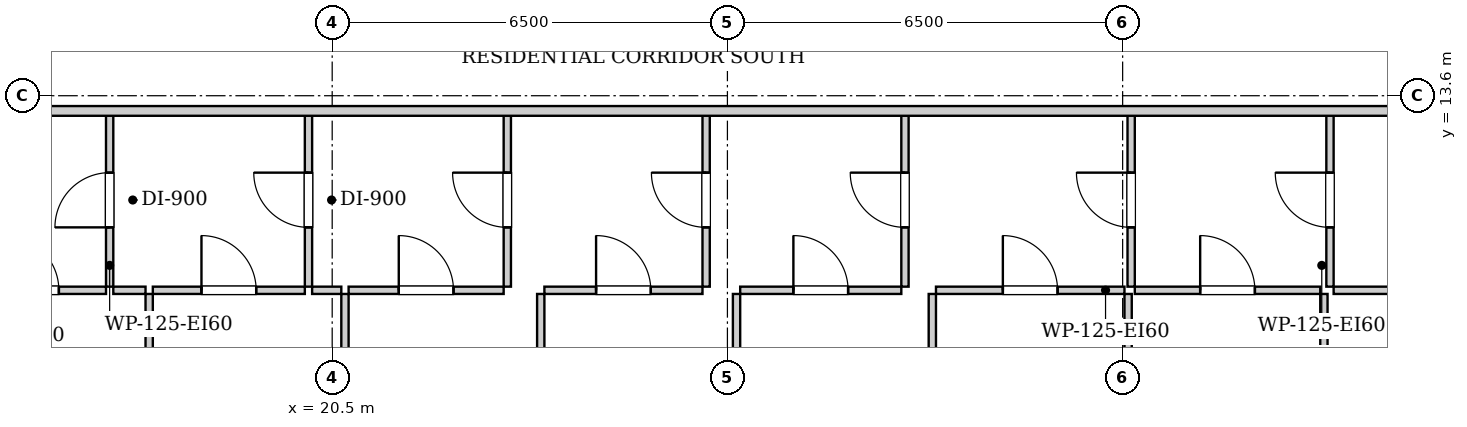
"""IFC4 building model, lengths in metres.
Left out: names, types, materials, properties, quantities, classifications, styles, units other than length and angle.
Written with IfcOpenShell. Run it as: python <this file> out.ifc"""

import sys

from ifc_helpers import new_model, si_unit, direction, frame, frame_2d, origin, place, context, subcontext, project, spatial, rectangle, extrude, element, fill, save


model = new_model("IFC4")
c1 = context("Model", 3, precision=1e-05, world=origin(), true_north=direction((0.0, 1.0)))
c2 = subcontext(c1, "Body", "Model", "MODEL_VIEW")
j1 = project(units=[si_unit("LENGTHUNIT", "METRE"), si_unit("PLANEANGLEUNIT", "RADIAN")], contexts=[c1])
p1 = place(None, origin())
s1 = spatial("IfcSite", under=j1, at=p1, CompositionType="ELEMENT")
p2 = place(p1, origin())
s2 = spatial("IfcBuilding", under=s1, at=p2, CompositionType="ELEMENT")
p3 = place(p2, frame((0.0, 0.0, 97.5)))
s3 = spatial("IfcBuildingStorey", under=s2, at=p3, CompositionType="ELEMENT", Elevation=97.5)
p4 = place(p3, frame((16.84, 10.46, 0.0), z_axis=(0.0, 0.0, 1.0), x_axis=(0.0, 1.0, 0.0)))
e1 = element("IfcWall", 1, at=p4, inside=s3, PredefinedType="PARTITIONING", context=c2, shape_type="SweptSolid", body=[
    extrude(rectangle(XDim=2.85, YDim=0.12, at=frame_2d((1.425, 0.0))), origin(), (0.0, 0.0, 1.0), 2.94),
])
p5 = place(p4, frame((0.975, 0.0, 0.0)))
e2 = element("IfcOpeningElement", 2, at=p5, cuts=e1, PredefinedType="OPENING", context=c2, shape_type="SweptSolid", body=[
    extrude(rectangle(XDim=0.9, YDim=2.05, at=frame_2d((0.45, 1.025))), frame((0.0, 0.07, 0.0), z_axis=(0.0, -1.0, 0.0), x_axis=(1.0, 0.0, 0.0)), (0.0, 0.0, 1.0), 0.14),
])
p6 = place(p3, frame((14.33, 10.4, 0.0), z_axis=(0.0, 0.0, 1.0), x_axis=(1.0, 0.0, 0.0)))
e3 = element("IfcWall", 3, at=p6, inside=s3, PredefinedType="PARTITIONING", context=c2, shape_type="SweptSolid", body=[
    extrude(rectangle(XDim=2.45, YDim=0.12, at=frame_2d((1.225, 0.0))), origin(), (0.0, 0.0, 1.0), 2.94),
])
p7 = place(p6, frame((0.775, 0.0, 0.0)))
e4 = element("IfcOpeningElement", 4, at=p7, cuts=e3, PredefinedType="OPENING", context=c2, shape_type="SweptSolid", body=[
    extrude(rectangle(XDim=0.9, YDim=2.05, at=frame_2d((0.45, 1.025))), frame((0.0, 0.07, 0.0), z_axis=(0.0, -1.0, 0.0), x_axis=(1.0, 0.0, 0.0)), (0.0, 0.0, 1.0), 0.14),
])
p8 = place(p3, frame((20.11, 10.46, 0.0), z_axis=(0.0, 0.0, 1.0), x_axis=(0.0, 1.0, 0.0)))
e5 = element("IfcWall", 5, at=p8, inside=s3, PredefinedType="PARTITIONING", context=c2, shape_type="SweptSolid", body=[
    extrude(rectangle(XDim=2.85, YDim=0.12, at=frame_2d((1.425, 0.0))), origin(), (0.0, 0.0, 1.0), 2.94),
])
p9 = place(p8, frame((0.975, 0.0, 0.0)))
e6 = element("IfcOpeningElement", 6, at=p9, cuts=e5, PredefinedType="OPENING", context=c2, shape_type="SweptSolid", body=[
    extrude(rectangle(XDim=0.9, YDim=2.05, at=frame_2d((0.45, 1.025))), frame((0.0, 0.07, 0.0), z_axis=(0.0, -1.0, 0.0), x_axis=(1.0, 0.0, 0.0)), (0.0, 0.0, 1.0), 0.14),
])
p10 = place(p3, frame((16.9, 10.4, 0.0), z_axis=(0.0, 0.0, 1.0), x_axis=(1.0, 0.0, 0.0)))
e7 = element("IfcWall", 7, at=p10, inside=s3, PredefinedType="PARTITIONING", context=c2, shape_type="SweptSolid", body=[
    extrude(rectangle(XDim=0.53, YDim=0.12, at=frame_2d((0.265, 0.0))), origin(), (0.0, 0.0, 1.0), 2.94),
])
p11 = place(p3, frame((17.55, 10.4, 0.0), z_axis=(0.0, 0.0, 1.0), x_axis=(1.0, 0.0, 0.0)))
e8 = element("IfcWall", 8, at=p11, inside=s3, PredefinedType="PARTITIONING", context=c2, shape_type="SweptSolid", body=[
    extrude(rectangle(XDim=2.5, YDim=0.12, at=frame_2d((1.25, 0.0))), origin(), (0.0, 0.0, 1.0), 2.94),
])
p12 = place(p11, frame((0.8, 0.0, 0.0)))
e9 = element("IfcOpeningElement", 9, at=p12, cuts=e8, PredefinedType="OPENING", context=c2, shape_type="SweptSolid", body=[
    extrude(rectangle(XDim=0.9, YDim=2.05, at=frame_2d((0.45, 1.025))), frame((0.0, 0.07, 0.0), z_axis=(0.0, -1.0, 0.0), x_axis=(1.0, 0.0, 0.0)), (0.0, 0.0, 1.0), 0.14),
])
p13 = place(p3, frame((23.38, 10.46, 0.0), z_axis=(0.0, 0.0, 1.0), x_axis=(0.0, 1.0, 0.0)))
e10 = element("IfcWall", 10, at=p13, inside=s3, PredefinedType="PARTITIONING", context=c2, shape_type="SweptSolid", body=[
    extrude(rectangle(XDim=2.85, YDim=0.12, at=frame_2d((1.425, 0.0))), origin(), (0.0, 0.0, 1.0), 2.94),
])
p14 = place(p13, frame((0.975, 0.0, 0.0)))
e11 = element("IfcOpeningElement", 11, at=p14, cuts=e10, PredefinedType="OPENING", context=c2, shape_type="SweptSolid", body=[
    extrude(rectangle(XDim=0.9, YDim=2.05, at=frame_2d((0.45, 1.025))), frame((0.0, 0.07, 0.0), z_axis=(0.0, -1.0, 0.0), x_axis=(1.0, 0.0, 0.0)), (0.0, 0.0, 1.0), 0.14),
])
p15 = place(p3, frame((20.17, 10.4, 0.0), z_axis=(0.0, 0.0, 1.0), x_axis=(1.0, 0.0, 0.0)))
e12 = element("IfcWall", 12, at=p15, inside=s3, PredefinedType="PARTITIONING", context=c2, shape_type="SweptSolid", body=[
    extrude(rectangle(XDim=0.48, YDim=0.12, at=frame_2d((0.24, 0.0))), origin(), (0.0, 0.0, 1.0), 2.94),
])
p16 = place(p3, frame((20.77, 10.4, 0.0), z_axis=(0.0, 0.0, 1.0), x_axis=(1.0, 0.0, 0.0)))
e13 = element("IfcWall", 13, at=p16, inside=s3, PredefinedType="PARTITIONING", context=c2, shape_type="SweptSolid", body=[
    extrude(rectangle(XDim=2.55, YDim=0.12, at=frame_2d((1.275, 0.0))), origin(), (0.0, 0.0, 1.0), 2.94),
])
p17 = place(p16, frame((0.825, 0.0, 0.0)))
e14 = element("IfcOpeningElement", 14, at=p17, cuts=e13, PredefinedType="OPENING", context=c2, shape_type="SweptSolid", body=[
    extrude(rectangle(XDim=0.9, YDim=2.05, at=frame_2d((0.45, 1.025))), frame((0.0, 0.07, 0.0), z_axis=(0.0, -1.0, 0.0), x_axis=(1.0, 0.0, 0.0)), (0.0, 0.0, 1.0), 0.14),
])
p18 = place(p3, frame((26.65, 10.46, 0.0), z_axis=(0.0, 0.0, 1.0), x_axis=(0.0, 1.0, 0.0)))
e15 = element("IfcWall", 15, at=p18, inside=s3, PredefinedType="PARTITIONING", context=c2, shape_type="SweptSolid", body=[
    extrude(rectangle(XDim=2.85, YDim=0.12, at=frame_2d((1.425, 0.0))), origin(), (0.0, 0.0, 1.0), 2.94),
])
p19 = place(p18, frame((0.975, 0.0, 0.0)))
e16 = element("IfcOpeningElement", 16, at=p19, cuts=e15, PredefinedType="OPENING", context=c2, shape_type="SweptSolid", body=[
    extrude(rectangle(XDim=0.9, YDim=2.05, at=frame_2d((0.45, 1.025))), frame((0.0, 0.07, 0.0), z_axis=(0.0, -1.0, 0.0), x_axis=(1.0, 0.0, 0.0)), (0.0, 0.0, 1.0), 0.14),
])
p20 = place(p3, frame((23.99, 10.4, 0.0), z_axis=(0.0, 0.0, 1.0), x_axis=(1.0, 0.0, 0.0)))
e17 = element("IfcWall", 17, at=p20, inside=s3, PredefinedType="PARTITIONING", context=c2, shape_type="SweptSolid", body=[
    extrude(rectangle(XDim=2.6, YDim=0.12, at=frame_2d((1.3, 0.0))), origin(), (0.0, 0.0, 1.0), 2.94),
])
p21 = place(p20, frame((0.85, 0.0, 0.0)))
e18 = element("IfcOpeningElement", 18, at=p21, cuts=e17, PredefinedType="OPENING", context=c2, shape_type="SweptSolid", body=[
    extrude(rectangle(XDim=0.9, YDim=2.05, at=frame_2d((0.45, 1.025))), frame((0.0, 0.07, 0.0), z_axis=(0.0, -1.0, 0.0), x_axis=(1.0, 0.0, 0.0)), (0.0, 0.0, 1.0), 0.14),
])
p22 = place(p3, frame((29.92, 10.46, 0.0), z_axis=(0.0, 0.0, 1.0), x_axis=(0.0, 1.0, 0.0)))
e19 = element("IfcWall", 19, at=p22, inside=s3, PredefinedType="PARTITIONING", context=c2, shape_type="SweptSolid", body=[
    extrude(rectangle(XDim=2.85, YDim=0.12, at=frame_2d((1.425, 0.0))), origin(), (0.0, 0.0, 1.0), 2.94),
])
p23 = place(p22, frame((0.975, 0.0, 0.0)))
e20 = element("IfcOpeningElement", 20, at=p23, cuts=e19, PredefinedType="OPENING", context=c2, shape_type="SweptSolid", body=[
    extrude(rectangle(XDim=0.9, YDim=2.05, at=frame_2d((0.45, 1.025))), frame((0.0, 0.07, 0.0), z_axis=(0.0, -1.0, 0.0), x_axis=(1.0, 0.0, 0.0)), (0.0, 0.0, 1.0), 0.14),
])
p24 = place(p3, frame((27.21, 10.4, 0.0), z_axis=(0.0, 0.0, 1.0), x_axis=(1.0, 0.0, 0.0)))
e21 = element("IfcWall", 21, at=p24, inside=s3, PredefinedType="PARTITIONING", context=c2, shape_type="SweptSolid", body=[
    extrude(rectangle(XDim=2.65, YDim=0.12, at=frame_2d((1.325, 0.0))), origin(), (0.0, 0.0, 1.0), 2.94),
])
p25 = place(p24, frame((0.875, 0.0, 0.0)))
e22 = element("IfcOpeningElement", 22, at=p25, cuts=e21, PredefinedType="OPENING", context=c2, shape_type="SweptSolid", body=[
    extrude(rectangle(XDim=0.9, YDim=2.05, at=frame_2d((0.45, 1.025))), frame((0.0, 0.07, 0.0), z_axis=(0.0, -1.0, 0.0), x_axis=(1.0, 0.0, 0.0)), (0.0, 0.0, 1.0), 0.14),
])
p26 = place(p3, frame((33.64, 10.46, 0.0), z_axis=(0.0, 0.0, 1.0), x_axis=(0.0, 1.0, 0.0)))
e23 = element("IfcWall", 23, at=p26, inside=s3, PredefinedType="PARTITIONING", context=c2, shape_type="SweptSolid", body=[
    extrude(rectangle(XDim=2.85, YDim=0.12, at=frame_2d((1.425, 0.0))), origin(), (0.0, 0.0, 1.0), 2.94),
])
p27 = place(p26, frame((0.975, 0.0, 0.0)))
e24 = element("IfcOpeningElement", 24, at=p27, cuts=e23, PredefinedType="OPENING", context=c2, shape_type="SweptSolid", body=[
    extrude(rectangle(XDim=0.9, YDim=2.05, at=frame_2d((0.45, 1.025))), frame((0.0, 0.07, 0.0), z_axis=(0.0, -1.0, 0.0), x_axis=(1.0, 0.0, 0.0)), (0.0, 0.0, 1.0), 0.14),
])
p28 = place(p3, frame((30.43, 10.4, 0.0), z_axis=(0.0, 0.0, 1.0), x_axis=(1.0, 0.0, 0.0)))
e25 = element("IfcWall", 25, at=p28, inside=s3, PredefinedType="PARTITIONING", context=c2, shape_type="SweptSolid", body=[
    extrude(rectangle(XDim=3.1, YDim=0.12, at=frame_2d((1.55, 0.0))), origin(), (0.0, 0.0, 1.0), 2.94),
])
p29 = place(p28, frame((1.1, 0.0, 0.0)))
e26 = element("IfcOpeningElement", 26, at=p29, cuts=e25, PredefinedType="OPENING", context=c2, shape_type="SweptSolid", body=[
    extrude(rectangle(XDim=0.9, YDim=2.05, at=frame_2d((0.45, 1.025))), frame((0.0, 0.07, 0.0), z_axis=(0.0, -1.0, 0.0), x_axis=(1.0, 0.0, 0.0)), (0.0, 0.0, 1.0), 0.14),
])
p30 = place(p3, frame((36.91, 10.46, 0.0), z_axis=(0.0, 0.0, 1.0), x_axis=(0.0, 1.0, 0.0)))
e27 = element("IfcWall", 27, at=p30, inside=s3, PredefinedType="PARTITIONING", context=c2, shape_type="SweptSolid", body=[
    extrude(rectangle(XDim=2.85, YDim=0.12, at=frame_2d((1.425, 0.0))), origin(), (0.0, 0.0, 1.0), 2.94),
])
p31 = place(p30, frame((0.975, 0.0, 0.0)))
e28 = element("IfcOpeningElement", 28, at=p31, cuts=e27, PredefinedType="OPENING", context=c2, shape_type="SweptSolid", body=[
    extrude(rectangle(XDim=0.9, YDim=2.05, at=frame_2d((0.45, 1.025))), frame((0.0, 0.07, 0.0), z_axis=(0.0, -1.0, 0.0), x_axis=(1.0, 0.0, 0.0)), (0.0, 0.0, 1.0), 0.14),
])
p32 = place(p3, frame((33.7, 10.4, 0.0), z_axis=(0.0, 0.0, 1.0), x_axis=(1.0, 0.0, 0.0)))
e29 = element("IfcWall", 29, at=p32, inside=s3, PredefinedType="PARTITIONING", context=c2, shape_type="SweptSolid", body=[
    extrude(rectangle(XDim=3.05, YDim=0.12, at=frame_2d((1.525, 0.0))), origin(), (0.0, 0.0, 1.0), 2.94),
])
p33 = place(p32, frame((1.075, 0.0, 0.0)))
e30 = element("IfcOpeningElement", 30, at=p33, cuts=e29, PredefinedType="OPENING", context=c2, shape_type="SweptSolid", body=[
    extrude(rectangle(XDim=0.9, YDim=2.05, at=frame_2d((0.45, 1.025))), frame((0.0, 0.07, 0.0), z_axis=(0.0, -1.0, 0.0), x_axis=(1.0, 0.0, 0.0)), (0.0, 0.0, 1.0), 0.14),
])
p34 = place(p3, frame((36.97, 10.4, 0.0), z_axis=(0.0, 0.0, 1.0), x_axis=(1.0, 0.0, 0.0)))
e31 = element("IfcWall", 31, at=p34, inside=s3, PredefinedType="PARTITIONING", context=c2, shape_type="SweptSolid", body=[
    extrude(rectangle(XDim=3.85, YDim=0.12, at=frame_2d((1.925, 0.0))), origin(), (0.0, 0.0, 1.0), 2.94),
])
p35 = place(p34, frame((1.475, 0.0, 0.0)))
e32 = element("IfcOpeningElement", 32, at=p35, cuts=e31, PredefinedType="OPENING", context=c2, shape_type="SweptSolid", body=[
    extrude(rectangle(XDim=0.9, YDim=2.05, at=frame_2d((0.45, 1.025))), frame((0.0, 0.07, 0.0), z_axis=(0.0, -1.0, 0.0), x_axis=(1.0, 0.0, 0.0)), (0.0, 0.0, 1.0), 0.14),
])
p36 = place(p3, frame((17.49, 0.28, 0.0), z_axis=(0.0, 0.0, 1.0), x_axis=(0.0, 1.0, 0.0)))
e33 = element("IfcWall", 33, at=p36, inside=s3, PredefinedType="PARTITIONING", context=c2, shape_type="SweptSolid", body=[
    extrude(rectangle(XDim=10.06, YDim=0.12, at=frame_2d((5.03, 0.0))), origin(), (0.0, 0.0, 1.0), 2.94),
])
p37 = place(p36, frame((4.565, 0.0, 0.0)))
e34 = element("IfcOpeningElement", 34, at=p37, cuts=e33, PredefinedType="OPENING", context=c2, shape_type="SweptSolid", body=[
    extrude(rectangle(XDim=0.9, YDim=2.05, at=frame_2d((0.45, 1.025))), frame((0.0, 0.07, 0.0), z_axis=(0.0, -1.0, 0.0), x_axis=(1.0, 0.0, 0.0)), (0.0, 0.0, 1.0), 0.14),
])
p38 = place(p3, frame((20.71, 0.28, 0.0), z_axis=(0.0, 0.0, 1.0), x_axis=(0.0, 1.0, 0.0)))
e35 = element("IfcWall", 35, at=p38, inside=s3, PredefinedType="PARTITIONING", context=c2, shape_type="SweptSolid", body=[
    extrude(rectangle(XDim=10.06, YDim=0.12, at=frame_2d((5.03, 0.0))), origin(), (0.0, 0.0, 1.0), 2.94),
])
p39 = place(p38, frame((4.565, 0.0, 0.0)))
e36 = element("IfcOpeningElement", 36, at=p39, cuts=e35, PredefinedType="OPENING", context=c2, shape_type="SweptSolid", body=[
    extrude(rectangle(XDim=0.9, YDim=2.05, at=frame_2d((0.45, 1.025))), frame((0.0, 0.07, 0.0), z_axis=(0.0, -1.0, 0.0), x_axis=(1.0, 0.0, 0.0)), (0.0, 0.0, 1.0), 0.14),
])
p40 = place(p3, frame((23.93, 0.28, 0.0), z_axis=(0.0, 0.0, 1.0), x_axis=(0.0, 1.0, 0.0)))
e37 = element("IfcWall", 37, at=p40, inside=s3, PredefinedType="PARTITIONING", context=c2, shape_type="SweptSolid", body=[
    extrude(rectangle(XDim=10.06, YDim=0.12, at=frame_2d((5.03, 0.0))), origin(), (0.0, 0.0, 1.0), 2.94),
])
p41 = place(p40, frame((4.565, 0.0, 0.0)))
e38 = element("IfcOpeningElement", 38, at=p41, cuts=e37, PredefinedType="OPENING", context=c2, shape_type="SweptSolid", body=[
    extrude(rectangle(XDim=0.9, YDim=2.05, at=frame_2d((0.45, 1.025))), frame((0.0, 0.07, 0.0), z_axis=(0.0, -1.0, 0.0), x_axis=(1.0, 0.0, 0.0)), (0.0, 0.0, 1.0), 0.14),
])
p42 = place(p3, frame((27.15, 0.28, 0.0), z_axis=(0.0, 0.0, 1.0), x_axis=(0.0, 1.0, 0.0)))
e39 = element("IfcWall", 39, at=p42, inside=s3, PredefinedType="PARTITIONING", context=c2, shape_type="SweptSolid", body=[
    extrude(rectangle(XDim=10.06, YDim=0.12, at=frame_2d((5.03, 0.0))), origin(), (0.0, 0.0, 1.0), 2.94),
])
p43 = place(p42, frame((4.565, 0.0, 0.0)))
e40 = element("IfcOpeningElement", 40, at=p43, cuts=e39, PredefinedType="OPENING", context=c2, shape_type="SweptSolid", body=[
    extrude(rectangle(XDim=0.9, YDim=2.05, at=frame_2d((0.45, 1.025))), frame((0.0, 0.07, 0.0), z_axis=(0.0, -1.0, 0.0), x_axis=(1.0, 0.0, 0.0)), (0.0, 0.0, 1.0), 0.14),
])
p44 = place(p3, frame((30.37, 0.28, 0.0), z_axis=(0.0, 0.0, 1.0), x_axis=(0.0, 1.0, 0.0)))
e41 = element("IfcWall", 41, at=p44, inside=s3, PredefinedType="PARTITIONING", context=c2, shape_type="SweptSolid", body=[
    extrude(rectangle(XDim=10.06, YDim=0.12, at=frame_2d((5.03, 0.0))), origin(), (0.0, 0.0, 1.0), 2.94),
])
p45 = place(p44, frame((4.565, 0.0, 0.0)))
e42 = element("IfcOpeningElement", 42, at=p45, cuts=e41, PredefinedType="OPENING", context=c2, shape_type="SweptSolid", body=[
    extrude(rectangle(XDim=0.9, YDim=2.05, at=frame_2d((0.45, 1.025))), frame((0.0, 0.07, 0.0), z_axis=(0.0, -1.0, 0.0), x_axis=(1.0, 0.0, 0.0)), (0.0, 0.0, 1.0), 0.14),
])
p46 = place(p3, frame((33.59, 0.28, 0.0), z_axis=(0.0, 0.0, 1.0), x_axis=(0.0, 1.0, 0.0)))
e43 = element("IfcWall", 43, at=p46, inside=s3, PredefinedType="PARTITIONING", context=c2, shape_type="SweptSolid", body=[
    extrude(rectangle(XDim=10.06, YDim=0.12, at=frame_2d((5.03, 0.0))), origin(), (0.0, 0.0, 1.0), 2.94),
])
p47 = place(p46, frame((4.565, 0.0, 0.0)))
e44 = element("IfcOpeningElement", 44, at=p47, cuts=e43, PredefinedType="OPENING", context=c2, shape_type="SweptSolid", body=[
    extrude(rectangle(XDim=0.9, YDim=2.05, at=frame_2d((0.45, 1.025))), frame((0.0, 0.07, 0.0), z_axis=(0.0, -1.0, 0.0), x_axis=(1.0, 0.0, 0.0)), (0.0, 0.0, 1.0), 0.14),
])
p48 = place(p3, frame((36.81, 0.28, 0.0), z_axis=(0.0, 0.0, 1.0), x_axis=(0.0, 1.0, 0.0)))
e45 = element("IfcWall", 45, at=p48, inside=s3, PredefinedType="PARTITIONING", context=c2, shape_type="SweptSolid", body=[
    extrude(rectangle(XDim=10.06, YDim=0.12, at=frame_2d((5.03, 0.0))), origin(), (0.0, 0.0, 1.0), 2.94),
])
p49 = place(p48, frame((4.565, 0.0, 0.0)))
e46 = element("IfcOpeningElement", 46, at=p49, cuts=e45, PredefinedType="OPENING", context=c2, shape_type="SweptSolid", body=[
    extrude(rectangle(XDim=0.9, YDim=2.05, at=frame_2d((0.45, 1.025))), frame((0.0, 0.07, 0.0), z_axis=(0.0, -1.0, 0.0), x_axis=(1.0, 0.0, 0.0)), (0.0, 0.0, 1.0), 0.14),
])
p50 = place(p3, frame((10.05, 13.35, 0.0), z_axis=(0.0, 0.0, 1.0), x_axis=(1.0, 0.0, 0.0)))
e47 = element("IfcWall", 47, at=p50, inside=s3, PredefinedType="PARTITIONING", context=c2, shape_type="SweptSolid", body=[
    extrude(rectangle(XDim=30.8, YDim=0.16, at=frame_2d((15.4, 0.0))), origin(), (0.0, 0.0, 1.0), 2.94),
])
p51 = place(p50, frame((4.165, 0.0, 0.0)))
e48 = element("IfcOpeningElement", 48, at=p51, cuts=e47, PredefinedType="OPENING", context=c2, shape_type="SweptSolid", body=[
    extrude(rectangle(XDim=0.95, YDim=2.1, at=frame_2d((0.475, 1.05))), frame((0.0, 0.09, 0.0), z_axis=(0.0, -1.0, 0.0), x_axis=(1.0, 0.0, 0.0)), (0.0, 0.0, 1.0), 0.18),
])
p52 = place(p5, origin())
e49 = element("IfcDoor", 49, at=p52, inside=s3, OperationType="SINGLE_SWING_LEFT", PredefinedType="DOOR", context=c2, shape_type="SweptSolid", body=[
    extrude(rectangle(XDim=0.9, YDim=2.05, at=frame_2d((0.45, 1.025))), frame((0.0, 0.025, 0.0), z_axis=(0.0, -1.0, 0.0), x_axis=(1.0, 0.0, 0.0)), (0.0, 0.0, 1.0), 0.05),
])
fill(e2, e49)
p53 = place(p7, origin())
e50 = element("IfcDoor", 50, at=p53, inside=s3, OperationType="SINGLE_SWING_LEFT", PredefinedType="DOOR", context=c2, shape_type="SweptSolid", body=[
    extrude(rectangle(XDim=0.9, YDim=2.05, at=frame_2d((0.45, 1.025))), frame((0.0, 0.025, 0.0), z_axis=(0.0, -1.0, 0.0), x_axis=(1.0, 0.0, 0.0)), (0.0, 0.0, 1.0), 0.05),
])
fill(e4, e50)
p54 = place(p9, origin())
e51 = element("IfcDoor", 51, at=p54, inside=s3, OperationType="SINGLE_SWING_RIGHT", PredefinedType="DOOR", context=c2, shape_type="SweptSolid", body=[
    extrude(rectangle(XDim=0.9, YDim=2.05, at=frame_2d((0.45, 1.025))), frame((0.0, 0.025, 0.0), z_axis=(0.0, -1.0, 0.0), x_axis=(1.0, 0.0, 0.0)), (0.0, 0.0, 1.0), 0.05),
])
fill(e6, e51)
p55 = place(p12, origin())
e52 = element("IfcDoor", 52, at=p55, inside=s3, OperationType="SINGLE_SWING_LEFT", PredefinedType="DOOR", context=c2, shape_type="SweptSolid", body=[
    extrude(rectangle(XDim=0.9, YDim=2.05, at=frame_2d((0.45, 1.025))), frame((0.0, 0.025, 0.0), z_axis=(0.0, -1.0, 0.0), x_axis=(1.0, 0.0, 0.0)), (0.0, 0.0, 1.0), 0.05),
])
fill(e9, e52)
p56 = place(p14, origin())
e53 = element("IfcDoor", 53, at=p56, inside=s3, OperationType="SINGLE_SWING_RIGHT", PredefinedType="DOOR", context=c2, shape_type="SweptSolid", body=[
    extrude(rectangle(XDim=0.9, YDim=2.05, at=frame_2d((0.45, 1.025))), frame((0.0, 0.025, 0.0), z_axis=(0.0, -1.0, 0.0), x_axis=(1.0, 0.0, 0.0)), (0.0, 0.0, 1.0), 0.05),
])
fill(e11, e53)
p57 = place(p17, origin())
e54 = element("IfcDoor", 54, at=p57, inside=s3, OperationType="SINGLE_SWING_LEFT", PredefinedType="DOOR", context=c2, shape_type="SweptSolid", body=[
    extrude(rectangle(XDim=0.9, YDim=2.05, at=frame_2d((0.45, 1.025))), frame((0.0, 0.025, 0.0), z_axis=(0.0, -1.0, 0.0), x_axis=(1.0, 0.0, 0.0)), (0.0, 0.0, 1.0), 0.05),
])
fill(e14, e54)
p58 = place(p19, origin())
e55 = element("IfcDoor", 55, at=p58, inside=s3, OperationType="SINGLE_SWING_RIGHT", PredefinedType="DOOR", context=c2, shape_type="SweptSolid", body=[
    extrude(rectangle(XDim=0.9, YDim=2.05, at=frame_2d((0.45, 1.025))), frame((0.0, 0.025, 0.0), z_axis=(0.0, -1.0, 0.0), x_axis=(1.0, 0.0, 0.0)), (0.0, 0.0, 1.0), 0.05),
])
fill(e16, e55)
p59 = place(p21, origin())
e56 = element("IfcDoor", 56, at=p59, inside=s3, OperationType="SINGLE_SWING_LEFT", PredefinedType="DOOR", context=c2, shape_type="SweptSolid", body=[
    extrude(rectangle(XDim=0.9, YDim=2.05, at=frame_2d((0.45, 1.025))), frame((0.0, 0.025, 0.0), z_axis=(0.0, -1.0, 0.0), x_axis=(1.0, 0.0, 0.0)), (0.0, 0.0, 1.0), 0.05),
])
fill(e18, e56)
p60 = place(p23, origin())
e57 = element("IfcDoor", 57, at=p60, inside=s3, OperationType="SINGLE_SWING_RIGHT", PredefinedType="DOOR", context=c2, shape_type="SweptSolid", body=[
    extrude(rectangle(XDim=0.9, YDim=2.05, at=frame_2d((0.45, 1.025))), frame((0.0, 0.025, 0.0), z_axis=(0.0, -1.0, 0.0), x_axis=(1.0, 0.0, 0.0)), (0.0, 0.0, 1.0), 0.05),
])
fill(e20, e57)
p61 = place(p25, origin())
e58 = element("IfcDoor", 58, at=p61, inside=s3, OperationType="SINGLE_SWING_LEFT", PredefinedType="DOOR", context=c2, shape_type="SweptSolid", body=[
    extrude(rectangle(XDim=0.9, YDim=2.05, at=frame_2d((0.45, 1.025))), frame((0.0, 0.025, 0.0), z_axis=(0.0, -1.0, 0.0), x_axis=(1.0, 0.0, 0.0)), (0.0, 0.0, 1.0), 0.05),
])
fill(e22, e58)
p62 = place(p27, origin())
e59 = element("IfcDoor", 59, at=p62, inside=s3, OperationType="SINGLE_SWING_RIGHT", PredefinedType="DOOR", context=c2, shape_type="SweptSolid", body=[
    extrude(rectangle(XDim=0.9, YDim=2.05, at=frame_2d((0.45, 1.025))), frame((0.0, 0.025, 0.0), z_axis=(0.0, -1.0, 0.0), x_axis=(1.0, 0.0, 0.0)), (0.0, 0.0, 1.0), 0.05),
])
fill(e24, e59)
p63 = place(p29, origin())
e60 = element("IfcDoor", 60, at=p63, inside=s3, OperationType="SINGLE_SWING_LEFT", PredefinedType="DOOR", context=c2, shape_type="SweptSolid", body=[
    extrude(rectangle(XDim=0.9, YDim=2.05, at=frame_2d((0.45, 1.025))), frame((0.0, 0.025, 0.0), z_axis=(0.0, -1.0, 0.0), x_axis=(1.0, 0.0, 0.0)), (0.0, 0.0, 1.0), 0.05),
])
fill(e26, e60)
p64 = place(p31, origin())
e61 = element("IfcDoor", 61, at=p64, inside=s3, OperationType="SINGLE_SWING_RIGHT", PredefinedType="DOOR", context=c2, shape_type="SweptSolid", body=[
    extrude(rectangle(XDim=0.9, YDim=2.05, at=frame_2d((0.45, 1.025))), frame((0.0, 0.025, 0.0), z_axis=(0.0, -1.0, 0.0), x_axis=(1.0, 0.0, 0.0)), (0.0, 0.0, 1.0), 0.05),
])
fill(e28, e61)
p65 = place(p33, origin())
e62 = element("IfcDoor", 62, at=p65, inside=s3, OperationType="SINGLE_SWING_LEFT", PredefinedType="DOOR", context=c2, shape_type="SweptSolid", body=[
    extrude(rectangle(XDim=0.9, YDim=2.05, at=frame_2d((0.45, 1.025))), frame((0.0, 0.025, 0.0), z_axis=(0.0, -1.0, 0.0), x_axis=(1.0, 0.0, 0.0)), (0.0, 0.0, 1.0), 0.05),
])
fill(e30, e62)
save(model, sys.argv[1])
